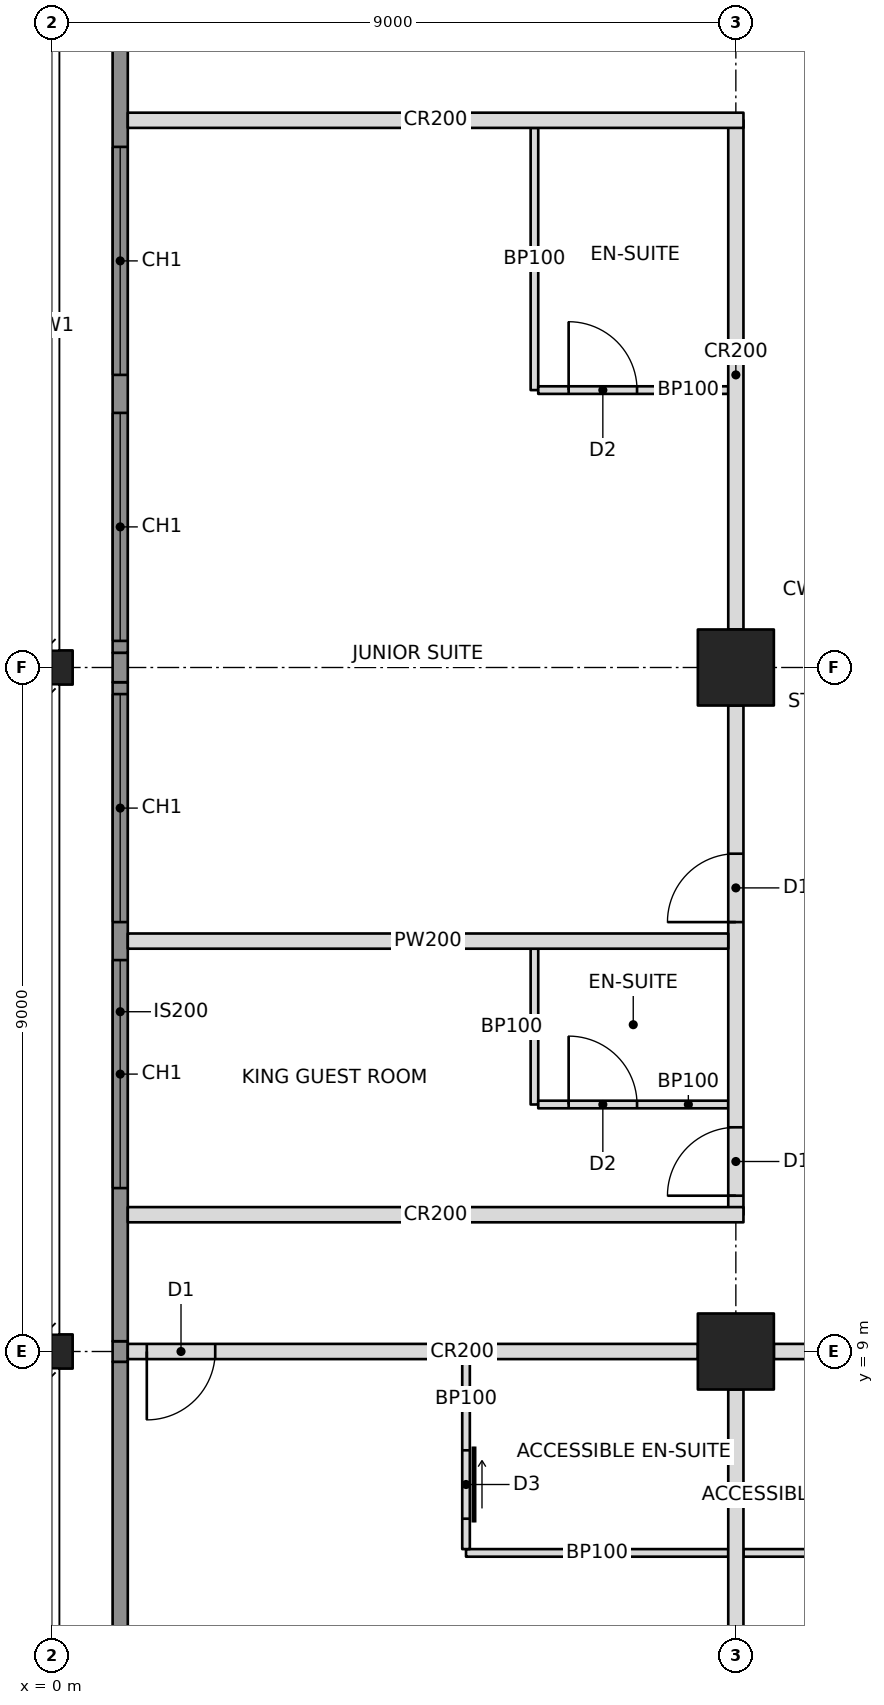
"""IFC4 building model, lengths in metres.
Left out: names, types, materials, properties, quantities, classifications, styles, units other than length and angle.
Written with IfcOpenShell. Run it as: python <this file> out.ifc"""

import sys

from ifc_helpers import new_model, si_unit, direction, frame, frame_2d, origin, origin_2d, place, context, subcontext, project, spatial, rectangle, hollow_rectangle, i_section, extrude, element, fill, save


model = new_model("IFC4")
c1 = context("Model", 3, precision=1e-05, world=origin(), true_north=direction((0.0, 1.0)))
c2 = subcontext(c1, "Body", "Model", "MODEL_VIEW")
j1 = project(units=[si_unit("LENGTHUNIT", "METRE"), si_unit("PLANEANGLEUNIT", "RADIAN")], contexts=[c1])
p1 = place(None, origin())
s1 = spatial("IfcSite", under=j1, at=p1, CompositionType="ELEMENT")
p2 = place(p1, origin())
s2 = spatial("IfcBuilding", under=s1, at=p2, CompositionType="ELEMENT")
p3 = place(p2, frame((0.0, 0.0, 97.6)))
s3 = spatial("IfcBuildingStorey", under=s2, at=p3, CompositionType="ELEMENT", Elevation=97.6)
for number, where, z_axis, x_axis in (
    (1, (0.0, 9.0, 0.0), (0.0, 0.0, 1.0), (0.0, 1.0, 0.0)),
    (2, (0.0, 18.0, 0.0), (0.0, 0.0, 1.0), (0.0, 1.0, 0.0)),
):
    element("IfcColumn", number, at=place(p3, frame(where, z_axis=z_axis, x_axis=x_axis)), inside=s3, PredefinedType="COLUMN", context=c2, shape_type="SweptSolid", body=[
        extrude(i_section(OverallWidth=0.449, OverallDepth=0.549, WebThickness=0.072, FlangeThickness=0.115, at=origin_2d()), origin(), (0.0, 0.0, 1.0), 3.4),
    ])
for number, where, z_axis, x_axis in (
    (3, (9.0, 9.0, 0.0), (0.0, 0.0, 1.0), (1.0, 0.0, 0.0)),
    (4, (9.0, 18.0, 0.0), (0.0, 0.0, 1.0), (1.0, 0.0, 0.0)),
):
    element("IfcColumn", number, at=place(p3, frame(where, z_axis=z_axis, x_axis=x_axis)), inside=s3, PredefinedType="COLUMN", context=c2, shape_type="SweptSolid", body=[
        extrude(hollow_rectangle(XDim=1.0, YDim=1.0, WallThickness=0.1, at=origin_2d()), origin(), (0.0, 0.0, 1.0), 3.4),
    ])
p4 = place(p3, frame((1.0, 9.0, 0.0), z_axis=(0.0, 0.0, 1.0), x_axis=(1.0, 0.0, 0.0)))
e5 = element("IfcWall", 5, at=p4, inside=s3, PredefinedType="PARTITIONING", context=c2, shape_type="SweptSolid", body=[
    extrude(rectangle(XDim=7.5, YDim=0.2, at=frame_2d((3.75, 0.0))), origin(), (0.0, 0.0, 1.0), 2.438),
])
p5 = place(p4, frame((0.25, 0.0, 0.0)))
e6 = element("IfcOpeningElement", 6, at=p5, cuts=e5, PredefinedType="OPENING", context=c2, shape_type="SweptSolid", body=[
    extrude(rectangle(XDim=0.9, YDim=2.1, at=frame_2d((0.45, 1.05))), frame((0.0, 0.11, 0.0), z_axis=(0.0, -1.0, 0.0), x_axis=(1.0, 0.0, 0.0)), (0.0, 0.0, 1.0), 0.22),
])
p6 = place(p3, frame((9.5, 9.0, 0.0), z_axis=(0.0, 0.0, 1.0), x_axis=(1.0, 0.0, 0.0)))
e7 = element("IfcWall", 7, at=p6, inside=s3, PredefinedType="PARTITIONING", context=c2, shape_type="SweptSolid", body=[
    extrude(rectangle(XDim=8.0, YDim=0.2, at=frame_2d((4.0, 0.0))), origin(), (0.0, 0.0, 1.0), 2.405),
])
p7 = place(p6, frame((2.85, 0.0, 0.0)))
e8 = element("IfcOpeningElement", 8, at=p7, cuts=e7, PredefinedType="OPENING", context=c2, shape_type="SweptSolid", body=[
    extrude(rectangle(XDim=0.9, YDim=2.1, at=frame_2d((0.45, 1.05))), frame((0.0, 0.11, 0.0), z_axis=(0.0, -1.0, 0.0), x_axis=(1.0, 0.0, 0.0)), (0.0, 0.0, 1.0), 0.22),
])
p8 = place(p6, frame((4.25, 0.0, 0.0)))
e9 = element("IfcOpeningElement", 9, at=p8, cuts=e7, PredefinedType="OPENING", context=c2, shape_type="SweptSolid", body=[
    extrude(rectangle(XDim=0.9, YDim=2.1, at=frame_2d((0.45, 1.05))), frame((0.0, 0.11, 0.0), z_axis=(0.0, -1.0, 0.0), x_axis=(1.0, 0.0, 0.0)), (0.0, 0.0, 1.0), 0.22),
])
p9 = place(p3, frame((9.0, 10.8, 0.0), z_axis=(0.0, 0.0, 1.0), x_axis=(0.0, 1.0, 0.0)))
e10 = element("IfcWall", 10, at=p9, inside=s3, PredefinedType="PARTITIONING", context=c2, shape_type="SweptSolid", body=[
    extrude(rectangle(XDim=6.7, YDim=0.2, at=frame_2d((3.35, 0.0))), origin(), (0.0, 0.0, 1.0), 2.405),
])
p10 = place(p9, frame((0.25, 0.0, 0.0)))
e11 = element("IfcOpeningElement", 11, at=p10, cuts=e10, PredefinedType="OPENING", context=c2, shape_type="SweptSolid", body=[
    extrude(rectangle(XDim=0.9, YDim=2.1, at=frame_2d((0.45, 1.05))), frame((0.0, 0.11, 0.0), z_axis=(0.0, -1.0, 0.0), x_axis=(1.0, 0.0, 0.0)), (0.0, 0.0, 1.0), 0.22),
])
p11 = place(p9, frame((3.85, 0.0, 0.0)))
e12 = element("IfcOpeningElement", 12, at=p11, cuts=e10, PredefinedType="OPENING", context=c2, shape_type="SweptSolid", body=[
    extrude(rectangle(XDim=0.9, YDim=2.1, at=frame_2d((0.45, 1.05))), frame((0.0, 0.11, 0.0), z_axis=(0.0, -1.0, 0.0), x_axis=(1.0, 0.0, 0.0)), (0.0, 0.0, 1.0), 0.22),
])
p12 = place(p3, frame((9.0, 18.5, 0.0), z_axis=(0.0, 0.0, 1.0), x_axis=(0.0, 1.0, 0.0)))
e13 = element("IfcWall", 13, at=p12, inside=s3, PredefinedType="PARTITIONING", context=c2, shape_type="SweptSolid", body=[
    extrude(rectangle(XDim=6.7, YDim=0.2, at=frame_2d((3.35, 0.0))), origin(), (0.0, 0.0, 1.0), 2.405),
])
for number, where, z_axis, x_axis in (
    (14, (1.0, 10.8, 0.0), (0.0, 0.0, 1.0), (1.0, 0.0, 0.0)),
    (15, (1.0, 25.2, 0.0), (0.0, 0.0, 1.0), (1.0, 0.0, 0.0)),
):
    element("IfcWall", number, at=place(p3, frame(where, z_axis=z_axis, x_axis=x_axis)), inside=s3, PredefinedType="PARTITIONING", context=c2, shape_type="SweptSolid", body=[
        extrude(rectangle(XDim=8.1, YDim=0.2, at=frame_2d((4.05, 0.0))), origin(), (0.0, 0.0, 1.0), 2.404),
    ])
p13 = place(p3, frame((9.0, 8.5, 0.0), z_axis=(0.0, 0.0, 1.0), x_axis=(0.0, -1.0, 0.0)))
e16 = element("IfcWall", 16, at=p13, inside=s3, PredefinedType="PARTITIONING", context=c2, shape_type="SweptSolid", body=[
    extrude(rectangle(XDim=7.5, YDim=0.2, at=frame_2d((3.75, 0.0))), origin(), (0.0, 0.0, 1.0), 2.438),
])
p14 = place(p3, frame((5.45, 6.35, 0.0), z_axis=(0.0, 0.0, 1.0), x_axis=(1.0, 0.0, 0.0)))
e17 = element("IfcWall", 17, at=p14, inside=s3, PredefinedType="PARTITIONING", context=c2, shape_type="SweptSolid", body=[
    extrude(rectangle(XDim=3.45, YDim=0.1, at=frame_2d((1.725, 0.0))), origin(), (0.0, 0.0, 1.0), 2.438),
])
p15 = place(p3, frame((5.45, 8.9, 0.0), z_axis=(0.0, 0.0, 1.0), x_axis=(0.0, -1.0, 0.0)))
e18 = element("IfcWall", 18, at=p15, inside=s3, PredefinedType="PARTITIONING", context=c2, shape_type="SweptSolid", body=[
    extrude(rectangle(XDim=2.5, YDim=0.1, at=frame_2d((1.25, 0.0))), origin(), (0.0, 0.0, 1.0), 2.438),
])
p16 = place(p15, frame((1.2, 0.0, 0.0)))
e19 = element("IfcOpeningElement", 19, at=p16, cuts=e18, PredefinedType="OPENING", context=c2, shape_type="SweptSolid", body=[
    extrude(rectangle(XDim=0.9, YDim=2.1, at=frame_2d((0.45, 1.05))), frame((0.0, 0.06, 0.0), z_axis=(0.0, -1.0, 0.0), x_axis=(1.0, 0.0, 0.0)), (0.0, 0.0, 1.0), 0.12),
])
p17 = place(p3, frame((9.1, 6.35, 0.0), z_axis=(0.0, 0.0, 1.0), x_axis=(1.0, 0.0, 0.0)))
e20 = element("IfcWall", 20, at=p17, inside=s3, PredefinedType="PARTITIONING", context=c2, shape_type="SweptSolid", body=[
    extrude(rectangle(XDim=2.95, YDim=0.1, at=frame_2d((1.475, 0.0))), origin(), (0.0, 0.0, 1.0), 2.438),
])
p18 = place(p3, frame((8.9, 14.4, 0.0), z_axis=(0.0, 0.0, 1.0), x_axis=(-1.0, 0.0, 0.0)))
e21 = element("IfcWall", 21, at=p18, inside=s3, PredefinedType="PARTITIONING", context=c2, shape_type="SweptSolid", body=[
    extrude(rectangle(XDim=7.9, YDim=0.2, at=frame_2d((3.95, 0.0))), origin(), (0.0, 0.0, 1.0), 2.404),
])
p19 = place(p3, frame((6.35, 12.25, 0.0), z_axis=(0.0, 0.0, 1.0), x_axis=(0.0, 1.0, 0.0)))
e22 = element("IfcWall", 22, at=p19, inside=s3, PredefinedType="PARTITIONING", context=c2, shape_type="SweptSolid", body=[
    extrude(rectangle(XDim=2.05, YDim=0.1, at=frame_2d((1.025, 0.0))), origin(), (0.0, 0.0, 1.0), 3.2),
])
p20 = place(p3, frame((8.9, 12.25, 0.0), z_axis=(0.0, 0.0, 1.0), x_axis=(-1.0, 0.0, 0.0)))
e23 = element("IfcWall", 23, at=p20, inside=s3, PredefinedType="PARTITIONING", context=c2, shape_type="SweptSolid", body=[
    extrude(rectangle(XDim=2.5, YDim=0.1, at=frame_2d((1.25, 0.0))), origin(), (0.0, 0.0, 1.0), 2.404),
])
p21 = place(p20, frame((1.2, 0.0, 0.0)))
e24 = element("IfcOpeningElement", 24, at=p21, cuts=e23, PredefinedType="OPENING", context=c2, shape_type="SweptSolid", body=[
    extrude(rectangle(XDim=0.9, YDim=2.1, at=frame_2d((0.45, 1.05))), frame((0.0, 0.06, 0.0), z_axis=(0.0, -1.0, 0.0), x_axis=(1.0, 0.0, 0.0)), (0.0, 0.0, 1.0), 0.12),
])
p22 = place(p3, frame((6.35, 21.65, 0.0), z_axis=(0.0, 0.0, 1.0), x_axis=(0.0, 1.0, 0.0)))
e25 = element("IfcWall", 25, at=p22, inside=s3, PredefinedType="PARTITIONING", context=c2, shape_type="SweptSolid", body=[
    extrude(rectangle(XDim=3.45, YDim=0.1, at=frame_2d((1.725, 0.0))), origin(), (0.0, 0.0, 1.0), 3.2),
])
p23 = place(p3, frame((8.9, 21.65, 0.0), z_axis=(0.0, 0.0, 1.0), x_axis=(-1.0, 0.0, 0.0)))
e26 = element("IfcWall", 26, at=p23, inside=s3, PredefinedType="PARTITIONING", context=c2, shape_type="SweptSolid", body=[
    extrude(rectangle(XDim=2.5, YDim=0.1, at=frame_2d((1.25, 0.0))), origin(), (0.0, 0.0, 1.0), 2.404),
])
p24 = place(p23, frame((1.2, 0.0, 0.0)))
e27 = element("IfcOpeningElement", 27, at=p24, cuts=e26, PredefinedType="OPENING", context=c2, shape_type="SweptSolid", body=[
    extrude(rectangle(XDim=0.9, YDim=2.1, at=frame_2d((0.45, 1.05))), frame((0.0, 0.06, 0.0), z_axis=(0.0, -1.0, 0.0), x_axis=(1.0, 0.0, 0.0)), (0.0, 0.0, 1.0), 0.12),
])
p25 = place(p3, frame((0.9, 4.607, 0.0), z_axis=(0.0, 0.0, 1.0), x_axis=(0.0, 1.0, 0.0)))
e28 = element("IfcWall", 28, at=p25, inside=s3, PredefinedType="SOLIDWALL", context=c2, shape_type="SweptSolid", body=[
    extrude(rectangle(XDim=4.257, YDim=0.2, at=frame_2d((2.129, 0.0))), origin(), (0.0, 0.0, 1.0), 3.2),
])
p26 = place(p3, frame((0.9, 8.865, 0.0), z_axis=(0.0, 0.0, 1.0), x_axis=(0.0, 1.0, 0.0)))
e29 = element("IfcWall", 29, at=p26, inside=s3, PredefinedType="SOLIDWALL", context=c2, shape_type="SweptSolid", body=[
    extrude(rectangle(XDim=0.271, YDim=0.2, at=frame_2d((0.135, 0.0))), origin(), (0.0, 0.0, 1.0), 2.438),
])
p27 = place(p3, frame((0.9, 9.135, 0.0), z_axis=(0.0, 0.0, 1.0), x_axis=(0.0, 1.0, 0.0)))
e30 = element("IfcWall", 30, at=p27, inside=s3, PredefinedType="SOLIDWALL", context=c2, shape_type="SweptSolid", body=[
    extrude(rectangle(XDim=8.671, YDim=0.2, at=frame_2d((4.335, 0.0))), origin(), (0.0, 0.0, 1.0), 3.2),
])
p28 = place(p27, frame((2.015, 0.0, 0.6)))
e31 = element("IfcOpeningElement", 31, at=p28, cuts=e30, PredefinedType="OPENING", context=c2, shape_type="SweptSolid", body=[
    extrude(rectangle(XDim=3.0, YDim=2.2, at=frame_2d((1.5, 1.1))), frame((0.0, 0.11, 0.0), z_axis=(0.0, -1.0, 0.0), x_axis=(1.0, 0.0, 0.0)), (0.0, 0.0, 1.0), 0.22),
])
p29 = place(p27, frame((5.515, 0.0, 0.6)))
e32 = element("IfcOpeningElement", 32, at=p29, cuts=e30, PredefinedType="OPENING", context=c2, shape_type="SweptSolid", body=[
    extrude(rectangle(XDim=3.0, YDim=2.2, at=frame_2d((1.5, 1.1))), frame((0.0, 0.11, 0.0), z_axis=(0.0, -1.0, 0.0), x_axis=(1.0, 0.0, 0.0)), (0.0, 0.0, 1.0), 0.22),
])
p30 = place(p3, frame((0.9, 17.806, 0.0), z_axis=(0.0, 0.0, 1.0), x_axis=(0.0, 1.0, 0.0)))
e33 = element("IfcWall", 33, at=p30, inside=s3, PredefinedType="SOLIDWALL", context=c2, shape_type="SweptSolid", body=[
    extrude(rectangle(XDim=0.388, YDim=0.2, at=frame_2d((0.194, 0.0))), origin(), (0.0, 0.0, 1.0), 2.404),
])
p31 = place(p3, frame((0.9, 18.194, 0.0), z_axis=(0.0, 0.0, 1.0), x_axis=(0.0, 1.0, 0.0)))
e34 = element("IfcWall", 34, at=p31, inside=s3, PredefinedType="SOLIDWALL", context=c2, shape_type="SweptSolid", body=[
    extrude(rectangle(XDim=8.671, YDim=0.2, at=frame_2d((4.335, 0.0))), origin(), (0.0, 0.0, 1.0), 3.2),
])
p32 = place(p31, frame((0.156, 0.0, 0.6)))
e35 = element("IfcOpeningElement", 35, at=p32, cuts=e34, PredefinedType="OPENING", context=c2, shape_type="SweptSolid", body=[
    extrude(rectangle(XDim=3.0, YDim=2.2, at=frame_2d((1.5, 1.1))), frame((0.0, 0.11, 0.0), z_axis=(0.0, -1.0, 0.0), x_axis=(1.0, 0.0, 0.0)), (0.0, 0.0, 1.0), 0.22),
])
p33 = place(p31, frame((3.656, 0.0, 0.6)))
e36 = element("IfcOpeningElement", 36, at=p33, cuts=e34, PredefinedType="OPENING", context=c2, shape_type="SweptSolid", body=[
    extrude(rectangle(XDim=3.0, YDim=2.2, at=frame_2d((1.5, 1.1))), frame((0.0, 0.11, 0.0), z_axis=(0.0, -1.0, 0.0), x_axis=(1.0, 0.0, 0.0)), (0.0, 0.0, 1.0), 0.22),
])
p34 = place(p28, origin())
e37 = element("IfcWindow", 37, at=p34, inside=s3, PartitioningType="TRIPLE_PANEL_VERTICAL", PredefinedType="WINDOW", context=c2, shape_type="SweptSolid", body=[
    extrude(rectangle(XDim=3.0, YDim=2.2, at=frame_2d((1.5, 1.1))), frame((0.0, 0.03, 0.0), z_axis=(0.0, -1.0, 0.0), x_axis=(1.0, 0.0, 0.0)), (0.0, 0.0, 1.0), 0.06),
])
fill(e31, e37)
p35 = place(p29, origin())
e38 = element("IfcWindow", 38, at=p35, inside=s3, PartitioningType="TRIPLE_PANEL_VERTICAL", PredefinedType="WINDOW", context=c2, shape_type="SweptSolid", body=[
    extrude(rectangle(XDim=3.0, YDim=2.2, at=frame_2d((1.5, 1.1))), frame((0.0, 0.03, 0.0), z_axis=(0.0, -1.0, 0.0), x_axis=(1.0, 0.0, 0.0)), (0.0, 0.0, 1.0), 0.06),
])
fill(e32, e38)
p36 = place(p32, origin())
e39 = element("IfcWindow", 39, at=p36, inside=s3, PartitioningType="TRIPLE_PANEL_VERTICAL", PredefinedType="WINDOW", context=c2, shape_type="SweptSolid", body=[
    extrude(rectangle(XDim=3.0, YDim=2.2, at=frame_2d((1.5, 1.1))), frame((0.0, 0.03, 0.0), z_axis=(0.0, -1.0, 0.0), x_axis=(1.0, 0.0, 0.0)), (0.0, 0.0, 1.0), 0.06),
])
fill(e35, e39)
p37 = place(p33, origin())
e40 = element("IfcWindow", 40, at=p37, inside=s3, PartitioningType="TRIPLE_PANEL_VERTICAL", PredefinedType="WINDOW", context=c2, shape_type="SweptSolid", body=[
    extrude(rectangle(XDim=3.0, YDim=2.2, at=frame_2d((1.5, 1.1))), frame((0.0, 0.03, 0.0), z_axis=(0.0, -1.0, 0.0), x_axis=(1.0, 0.0, 0.0)), (0.0, 0.0, 1.0), 0.06),
])
fill(e36, e40)
p38 = place(p16, origin())
e41 = element("IfcDoor", 41, at=p38, inside=s3, OperationType="SLIDING_TO_LEFT", PredefinedType="DOOR", context=c2, shape_type="SweptSolid", body=[
    extrude(rectangle(XDim=0.9, YDim=2.1, at=frame_2d((0.45, 1.05))), frame((0.0, 0.025, 0.0), z_axis=(0.0, -1.0, 0.0), x_axis=(1.0, 0.0, 0.0)), (0.0, 0.0, 1.0), 0.05),
])
fill(e19, e41)
p39 = place(p5, frame((0.9, 0.0, 0.0), z_axis=(0.0, 0.0, 1.0), x_axis=(-1.0, 0.0, 0.0)))
e42 = element("IfcDoor", 42, at=p39, inside=s3, OperationType="SINGLE_SWING_RIGHT", PredefinedType="DOOR", context=c2, shape_type="SweptSolid", body=[
    extrude(rectangle(XDim=0.9, YDim=2.1, at=frame_2d((0.45, 1.05))), frame((0.0, 0.025, 0.0), z_axis=(0.0, -1.0, 0.0), x_axis=(1.0, 0.0, 0.0)), (0.0, 0.0, 1.0), 0.05),
])
fill(e6, e42)
p40 = place(p21, frame((0.9, 0.0, 0.0), z_axis=(0.0, 0.0, 1.0), x_axis=(-1.0, 0.0, 0.0)))
e43 = element("IfcDoor", 43, at=p40, inside=s3, OperationType="SINGLE_SWING_LEFT", PredefinedType="DOOR", context=c2, shape_type="SweptSolid", body=[
    extrude(rectangle(XDim=0.9, YDim=2.1, at=frame_2d((0.45, 1.05))), frame((0.0, 0.025, 0.0), z_axis=(0.0, -1.0, 0.0), x_axis=(1.0, 0.0, 0.0)), (0.0, 0.0, 1.0), 0.05),
])
fill(e24, e43)
p41 = place(p10, origin())
e44 = element("IfcDoor", 44, at=p41, inside=s3, OperationType="SINGLE_SWING_LEFT", PredefinedType="DOOR", context=c2, shape_type="SweptSolid", body=[
    extrude(rectangle(XDim=0.9, YDim=2.1, at=frame_2d((0.45, 1.05))), frame((0.0, 0.025, 0.0), z_axis=(0.0, -1.0, 0.0), x_axis=(1.0, 0.0, 0.0)), (0.0, 0.0, 1.0), 0.05),
])
fill(e11, e44)
p42 = place(p24, frame((0.9, 0.0, 0.0), z_axis=(0.0, 0.0, 1.0), x_axis=(-1.0, 0.0, 0.0)))
e45 = element("IfcDoor", 45, at=p42, inside=s3, OperationType="SINGLE_SWING_LEFT", PredefinedType="DOOR", context=c2, shape_type="SweptSolid", body=[
    extrude(rectangle(XDim=0.9, YDim=2.1, at=frame_2d((0.45, 1.05))), frame((0.0, 0.025, 0.0), z_axis=(0.0, -1.0, 0.0), x_axis=(1.0, 0.0, 0.0)), (0.0, 0.0, 1.0), 0.05),
])
fill(e27, e45)
p43 = place(p11, origin())
e46 = element("IfcDoor", 46, at=p43, inside=s3, OperationType="SINGLE_SWING_LEFT", PredefinedType="DOOR", context=c2, shape_type="SweptSolid", body=[
    extrude(rectangle(XDim=0.9, YDim=2.1, at=frame_2d((0.45, 1.05))), frame((0.0, 0.025, 0.0), z_axis=(0.0, -1.0, 0.0), x_axis=(1.0, 0.0, 0.0)), (0.0, 0.0, 1.0), 0.05),
])
fill(e12, e46)
save(model, sys.argv[1])
